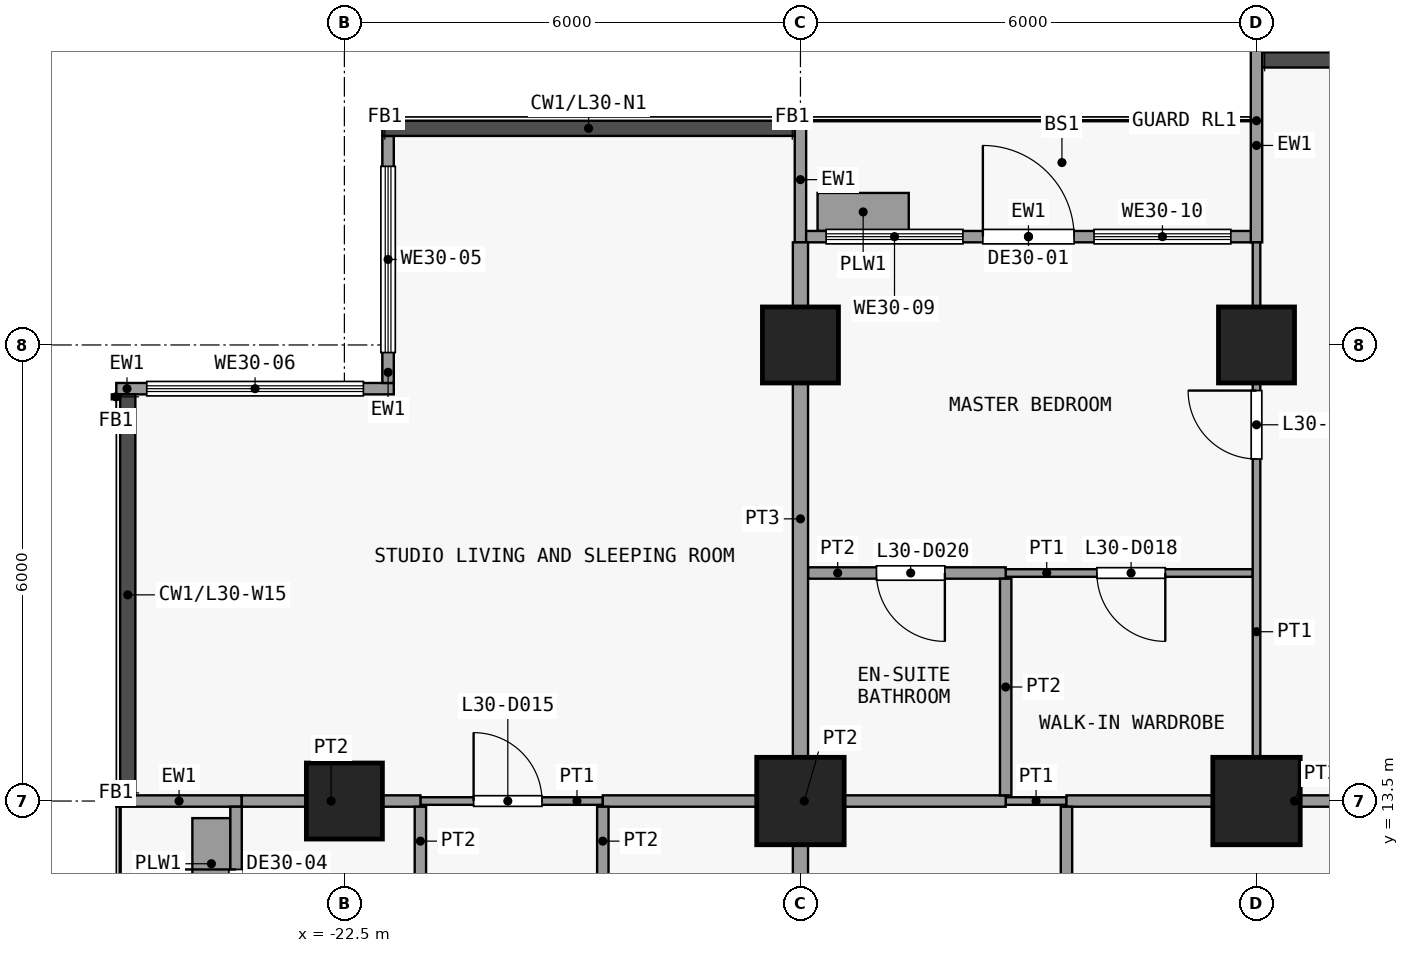
"""IFC4 building model, lengths in metres.
Left out: names, types, materials, properties, quantities, classifications, styles, units other than length and angle.
Written with IfcOpenShell. Run it as: python <this file> out.ifc"""

import sys

from ifc_helpers import new_model, si_unit, direction, frame, frame_2d, origin, origin_2d, place, context, subcontext, project, spatial, rectangle, extrude, element, fill, save


model = new_model("IFC4")
c1 = context("Model", 3, precision=1e-05, world=origin(), true_north=direction((0.0, 1.0)))
c2 = subcontext(c1, "Body", "Model", "MODEL_VIEW")
j1 = project(units=[si_unit("LENGTHUNIT", "METRE"), si_unit("PLANEANGLEUNIT", "RADIAN")], contexts=[c1])
p1 = place(None, origin())
s1 = spatial("IfcSite", under=j1, at=p1, CompositionType="ELEMENT")
p2 = place(p1, origin())
s2 = spatial("IfcBuilding", under=s1, at=p2, CompositionType="ELEMENT")
p3 = place(p2, frame((0.0, 0.0, 120.7)))
s3 = spatial("IfcBuildingStorey", under=s2, at=p3, CompositionType="ELEMENT", Elevation=120.7)
p4 = place(p3, frame((-22.5, 13.5, 0.0), z_axis=(0.0, 0.0, 1.0), x_axis=(1.0, 0.0, 0.0)))
e1 = element("IfcColumn", 1, at=p4, inside=s3, PredefinedType="COLUMN", context=c2, shape_type="SweptSolid", body=[
    extrude(rectangle(XDim=1.0, YDim=1.0, at=origin_2d()), origin(), (0.0, 0.0, 1.0), 3.6),
])
p5 = place(p3, frame((-16.5, 13.5, 0.0), z_axis=(0.0, 0.0, 1.0), x_axis=(1.0, 0.0, 0.0)))
e2 = element("IfcColumn", 2, at=p5, inside=s3, PredefinedType="COLUMN", context=c2, shape_type="SweptSolid", body=[
    extrude(rectangle(XDim=1.15, YDim=1.15, at=origin_2d()), origin(), (0.0, 0.0, 1.0), 3.6),
])
p6 = place(p3, frame((-16.5, 19.5, 0.0), z_axis=(0.0, 0.0, 1.0), x_axis=(1.0, 0.0, 0.0)))
e3 = element("IfcColumn", 3, at=p6, inside=s3, PredefinedType="COLUMN", context=c2, shape_type="SweptSolid", body=[
    extrude(rectangle(XDim=1.0, YDim=1.0, at=origin_2d()), origin(), (0.0, 0.0, 1.0), 3.6),
])
p7 = place(p3, frame((-10.5, 13.5, 0.0), z_axis=(0.0, 0.0, 1.0), x_axis=(1.0, 0.0, 0.0)))
e4 = element("IfcColumn", 4, at=p7, inside=s3, PredefinedType="COLUMN", context=c2, shape_type="SweptSolid", body=[
    extrude(rectangle(XDim=1.15, YDim=1.15, at=origin_2d()), origin(), (0.0, 0.0, 1.0), 3.6),
])
p8 = place(p3, frame((-10.5, 19.5, 0.0), z_axis=(0.0, 0.0, 1.0), x_axis=(1.0, 0.0, 0.0)))
e5 = element("IfcColumn", 5, at=p8, inside=s3, PredefinedType="COLUMN", context=c2, shape_type="SweptSolid", body=[
    extrude(rectangle(XDim=1.0, YDim=1.0, at=origin_2d()), origin(), (0.0, 0.0, 1.0), 3.6),
])
p9 = place(p3, frame((-21.925, 19.0, 0.0), z_axis=(0.0, 0.0, 1.0), x_axis=(0.0, 1.0, 0.0)))
e6 = element("IfcWall", 6, at=p9, inside=s3, PredefinedType="SOLIDWALL", context=c2, shape_type="SweptSolid", body=[
    extrude(rectangle(XDim=3.25, YDim=0.15, at=frame_2d((1.625, 0.0))), origin(), (0.0, 0.0, 1.0), 3.3),
])
p10 = place(p9, frame((0.4, 0.0, 0.9)))
e7 = element("IfcOpeningElement", 7, at=p10, cuts=e6, PredefinedType="OPENING", context=c2, shape_type="SweptSolid", body=[
    extrude(rectangle(XDim=2.45, YDim=2.4, at=frame_2d((1.225, 1.2))), frame((0.0, 0.085, 0.0), z_axis=(0.0, -1.0, 0.0), x_axis=(1.0, 0.0, 0.0)), (0.0, 0.0, 1.0), 0.17),
])
p11 = place(p3, frame((-25.5, 18.925, 0.0), z_axis=(0.0, 0.0, 1.0), x_axis=(1.0, 0.0, 0.0)))
e8 = element("IfcWall", 8, at=p11, inside=s3, PredefinedType="SOLIDWALL", context=c2, shape_type="SweptSolid", body=[
    extrude(rectangle(XDim=3.65, YDim=0.15, at=frame_2d((1.825, 0.0))), origin(), (0.0, 0.0, 1.0), 3.3),
])
p12 = place(p11, frame((0.4, 0.0, 0.9)))
e9 = element("IfcOpeningElement", 9, at=p12, cuts=e8, PredefinedType="OPENING", context=c2, shape_type="SweptSolid", body=[
    extrude(rectangle(XDim=2.85, YDim=2.4, at=frame_2d((1.425, 1.2))), frame((0.0, 0.085, 0.0), z_axis=(0.0, -1.0, 0.0), x_axis=(1.0, 0.0, 0.0)), (0.0, 0.0, 1.0), 0.17),
])
p13 = place(p3, frame((-16.5, 20.85, 0.0), z_axis=(0.0, 0.0, 1.0), x_axis=(0.0, 1.0, 0.0)))
e10 = element("IfcWall", 10, at=p13, inside=s3, PredefinedType="SOLIDWALL", context=c2, shape_type="SweptSolid", body=[
    extrude(rectangle(XDim=1.65, YDim=0.15, at=frame_2d((0.825, 0.0))), origin(), (0.0, 0.0, 1.0), 3.3),
])
p14 = place(p3, frame((-10.5, 20.85, 0.0), z_axis=(0.0, 0.0, 1.0), x_axis=(0.0, 1.0, 0.0)))
e11 = element("IfcWall", 11, at=p14, inside=s3, PredefinedType="SOLIDWALL", context=c2, shape_type="SweptSolid", body=[
    extrude(rectangle(XDim=2.55, YDim=0.15, at=frame_2d((1.275, 0.0))), origin(), (0.0, 0.0, 1.0), 3.3),
])
p15 = place(p3, frame((-16.425, 20.925, 0.0), z_axis=(0.0, 0.0, 1.0), x_axis=(1.0, 0.0, 0.0)))
e12 = element("IfcWall", 12, at=p15, inside=s3, PredefinedType="SOLIDWALL", context=c2, shape_type="SweptSolid", body=[
    extrude(rectangle(XDim=5.85, YDim=0.15, at=frame_2d((2.925, 0.0))), origin(), (0.0, 0.0, 1.0), 3.3),
])
p16 = place(p15, frame((2.325, 0.0, 0.0)))
e13 = element("IfcOpeningElement", 13, at=p16, cuts=e12, PredefinedType="OPENING", context=c2, shape_type="SweptSolid", body=[
    extrude(rectangle(XDim=1.2, YDim=2.4, at=frame_2d((0.6, 1.2))), frame((0.0, 0.085, 0.0), z_axis=(0.0, -1.0, 0.0), x_axis=(1.0, 0.0, 0.0)), (0.0, 0.0, 1.0), 0.17),
])
p17 = place(p15, frame((0.262, 0.0, 0.9)))
e14 = element("IfcOpeningElement", 14, at=p17, cuts=e12, PredefinedType="OPENING", context=c2, shape_type="SweptSolid", body=[
    extrude(rectangle(XDim=1.8, YDim=2.1, at=frame_2d((0.9, 1.05))), frame((0.0, 0.085, 0.0), z_axis=(0.0, -1.0, 0.0), x_axis=(1.0, 0.0, 0.0)), (0.0, 0.0, 1.0), 0.17),
])
p18 = place(p15, frame((3.788, 0.0, 0.9)))
e15 = element("IfcOpeningElement", 15, at=p18, cuts=e12, PredefinedType="OPENING", context=c2, shape_type="SweptSolid", body=[
    extrude(rectangle(XDim=1.8, YDim=2.1, at=frame_2d((0.9, 1.05))), frame((0.0, 0.085, 0.0), z_axis=(0.0, -1.0, 0.0), x_axis=(1.0, 0.0, 0.0)), (0.0, 0.0, 1.0), 0.17),
])
p19 = place(p3, frame((-16.275, 21.25, 0.0), z_axis=(0.0, 0.0, 1.0), x_axis=(1.0, 0.0, 0.0)))
e16 = element("IfcWall", 16, at=p19, inside=s3, PredefinedType="USERDEFINED", context=c2, shape_type="SweptSolid", body=[
    extrude(rectangle(XDim=1.2, YDim=0.5, at=frame_2d((0.6, 0.0))), origin(), (0.0, 0.0, 1.0), 0.9),
])
p20 = place(p3, frame((-23.85, 13.5, 0.0), z_axis=(0.0, 0.0, 1.0), x_axis=(-1.0, 0.0, 0.0)))
e17 = element("IfcWall", 17, at=p20, inside=s3, PredefinedType="SOLIDWALL", context=c2, shape_type="SweptSolid", body=[
    extrude(rectangle(XDim=1.65, YDim=0.15, at=frame_2d((0.825, 0.0))), origin(), (0.0, 0.0, 1.0), 3.3),
])
p21 = place(p3, frame((-23.925, 7.575, 0.0), z_axis=(0.0, 0.0, 1.0), x_axis=(0.0, 1.0, 0.0)))
e18 = element("IfcWall", 18, at=p21, inside=s3, PredefinedType="SOLIDWALL", context=c2, shape_type="SweptSolid", body=[
    extrude(rectangle(XDim=5.85, YDim=0.15, at=frame_2d((2.925, 0.0))), origin(), (0.0, 0.0, 1.0), 3.3),
])
p22 = place(p21, frame((3.825, 0.0, 0.0)))
e19 = element("IfcOpeningElement", 19, at=p22, cuts=e18, PredefinedType="OPENING", context=c2, shape_type="SweptSolid", body=[
    extrude(rectangle(XDim=1.2, YDim=2.4, at=frame_2d((0.6, 1.2))), frame((0.0, 0.085, 0.0), z_axis=(0.0, -1.0, 0.0), x_axis=(1.0, 0.0, 0.0)), (0.0, 0.0, 1.0), 0.17),
])
p23 = place(p21, frame((1.012, 0.0, 0.9)))
e20 = element("IfcOpeningElement", 20, at=p23, cuts=e18, PredefinedType="OPENING", context=c2, shape_type="SweptSolid", body=[
    extrude(rectangle(XDim=1.8, YDim=2.1, at=frame_2d((0.9, 1.05))), frame((0.0, 0.085, 0.0), z_axis=(0.0, -1.0, 0.0), x_axis=(1.0, 0.0, 0.0)), (0.0, 0.0, 1.0), 0.17),
])
p24 = place(p3, frame((-24.25, 12.075, 0.0), z_axis=(0.0, 0.0, 1.0), x_axis=(0.0, 1.0, 0.0)))
e21 = element("IfcWall", 21, at=p24, inside=s3, PredefinedType="USERDEFINED", context=c2, shape_type="SweptSolid", body=[
    extrude(rectangle(XDim=1.2, YDim=0.5, at=frame_2d((0.6, 0.0))), origin(), (0.0, 0.0, 1.0), 0.9),
])
p25 = place(p3, frame((-21.5, 13.5, 0.0), z_axis=(0.0, 0.0, 1.0), x_axis=(1.0, 0.0, 0.0)))
e22 = element("IfcWall", 22, at=p25, inside=s3, PredefinedType="PARTITIONING", context=c2, shape_type="SweptSolid", body=[
    extrude(rectangle(XDim=2.4, YDim=0.1, at=frame_2d((1.2, 0.0))), origin(), (0.0, 0.0, 1.0), 3.3),
])
p26 = place(p25, frame((0.7, 0.0, 0.0)))
e23 = element("IfcOpeningElement", 23, at=p26, cuts=e22, PredefinedType="OPENING", context=c2, shape_type="SweptSolid", body=[
    extrude(rectangle(XDim=0.9, YDim=2.1, at=frame_2d((0.45, 1.05))), frame((0.0, 0.06, 0.0), z_axis=(0.0, -1.0, 0.0), x_axis=(1.0, 0.0, 0.0)), (0.0, 0.0, 1.0), 0.12),
])
p27 = place(p3, frame((-13.8, 13.5, 0.0), z_axis=(0.0, 0.0, 1.0), x_axis=(1.0, 0.0, 0.0)))
e24 = element("IfcWall", 24, at=p27, inside=s3, PredefinedType="PARTITIONING", context=c2, shape_type="SweptSolid", body=[
    extrude(rectangle(XDim=0.8, YDim=0.1, at=frame_2d((0.4, 0.0))), origin(), (0.0, 0.0, 1.0), 3.3),
])
p28 = place(p3, frame((-23.85, 13.5, 0.0), z_axis=(0.0, 0.0, 1.0), x_axis=(1.0, 0.0, 0.0)))
e25 = element("IfcWall", 25, at=p28, inside=s3, PredefinedType="PARTITIONING", context=c2, shape_type="SweptSolid", body=[
    extrude(rectangle(XDim=2.35, YDim=0.15, at=frame_2d((1.175, 0.0))), origin(), (0.0, 0.0, 1.0), 3.3),
])
p29 = place(p3, frame((-19.1, 13.5, 0.0), z_axis=(0.0, 0.0, 1.0), x_axis=(1.0, 0.0, 0.0)))
e26 = element("IfcWall", 26, at=p29, inside=s3, PredefinedType="PARTITIONING", context=c2, shape_type="SweptSolid", body=[
    extrude(rectangle(XDim=5.3, YDim=0.15, at=frame_2d((2.65, 0.0))), origin(), (0.0, 0.0, 1.0), 3.3),
])
p30 = place(p3, frame((-13.0, 13.5, 0.0), z_axis=(0.0, 0.0, 1.0), x_axis=(1.0, 0.0, 0.0)))
e27 = element("IfcWall", 27, at=p30, inside=s3, PredefinedType="PARTITIONING", context=c2, shape_type="SweptSolid", body=[
    extrude(rectangle(XDim=6.0, YDim=0.15, at=frame_2d((3.0, 0.0))), origin(), (0.0, 0.0, 1.0), 3.3),
])
p31 = place(p3, frame((-13.8, 16.5, 0.0), z_axis=(0.0, 0.0, 1.0), x_axis=(1.0, 0.0, 0.0)))
e28 = element("IfcWall", 28, at=p31, inside=s3, PredefinedType="PARTITIONING", context=c2, shape_type="SweptSolid", body=[
    extrude(rectangle(XDim=3.25, YDim=0.1, at=frame_2d((1.625, 0.0))), origin(), (0.0, 0.0, 1.0), 3.3),
])
p32 = place(p31, frame((1.2, 0.0, 0.0)))
e29 = element("IfcOpeningElement", 29, at=p32, cuts=e28, PredefinedType="OPENING", context=c2, shape_type="SweptSolid", body=[
    extrude(rectangle(XDim=0.9, YDim=2.1, at=frame_2d((0.45, 1.05))), frame((0.0, 0.06, 0.0), z_axis=(0.0, -1.0, 0.0), x_axis=(1.0, 0.0, 0.0)), (0.0, 0.0, 1.0), 0.12),
])
p33 = place(p3, frame((-16.4, 16.5, 0.0), z_axis=(0.0, 0.0, 1.0), x_axis=(1.0, 0.0, 0.0)))
e30 = element("IfcWall", 30, at=p33, inside=s3, PredefinedType="PARTITIONING", context=c2, shape_type="SweptSolid", body=[
    extrude(rectangle(XDim=2.6, YDim=0.15, at=frame_2d((1.3, 0.0))), origin(), (0.0, 0.0, 1.0), 3.3),
])
p34 = place(p33, frame((0.9, 0.0, 0.0)))
e31 = element("IfcOpeningElement", 31, at=p34, cuts=e30, PredefinedType="OPENING", context=c2, shape_type="SweptSolid", body=[
    extrude(rectangle(XDim=0.9, YDim=2.1, at=frame_2d((0.45, 1.05))), frame((0.0, 0.085, 0.0), z_axis=(0.0, -1.0, 0.0), x_axis=(1.0, 0.0, 0.0)), (0.0, 0.0, 1.0), 0.17),
])
p35 = place(p3, frame((-21.5, 10.6, 0.0), z_axis=(0.0, 0.0, 1.0), x_axis=(0.0, 1.0, 0.0)))
e32 = element("IfcWall", 32, at=p35, inside=s3, PredefinedType="PARTITIONING", context=c2, shape_type="SweptSolid", body=[
    extrude(rectangle(XDim=2.825, YDim=0.15, at=frame_2d((1.413, 0.0))), origin(), (0.0, 0.0, 1.0), 3.3),
])
p36 = place(p35, frame((0.9, 0.0, 0.0)))
e33 = element("IfcOpeningElement", 33, at=p36, cuts=e32, PredefinedType="OPENING", context=c2, shape_type="SweptSolid", body=[
    extrude(rectangle(XDim=0.9, YDim=2.1, at=frame_2d((0.45, 1.05))), frame((0.0, 0.085, 0.0), z_axis=(0.0, -1.0, 0.0), x_axis=(1.0, 0.0, 0.0)), (0.0, 0.0, 1.0), 0.17),
])
p37 = place(p3, frame((-19.1, 10.6, 0.0), z_axis=(0.0, 0.0, 1.0), x_axis=(0.0, 1.0, 0.0)))
e34 = element("IfcWall", 34, at=p37, inside=s3, PredefinedType="PARTITIONING", context=c2, shape_type="SweptSolid", body=[
    extrude(rectangle(XDim=2.825, YDim=0.15, at=frame_2d((1.413, 0.0))), origin(), (0.0, 0.0, 1.0), 3.3),
])
p38 = place(p37, frame((0.9, 0.0, 0.0)))
e35 = element("IfcOpeningElement", 35, at=p38, cuts=e34, PredefinedType="OPENING", context=c2, shape_type="SweptSolid", body=[
    extrude(rectangle(XDim=0.9, YDim=2.1, at=frame_2d((0.45, 1.05))), frame((0.0, 0.085, 0.0), z_axis=(0.0, -1.0, 0.0), x_axis=(1.0, 0.0, 0.0)), (0.0, 0.0, 1.0), 0.17),
])
p39 = place(p3, frame((-16.5, 10.6, 0.0), z_axis=(0.0, 0.0, 1.0), x_axis=(0.0, 1.0, 0.0)))
e36 = element("IfcWall", 36, at=p39, inside=s3, PredefinedType="PARTITIONING", context=c2, shape_type="SweptSolid", body=[
    extrude(rectangle(XDim=2.825, YDim=0.2, at=frame_2d((1.413, 0.0))), origin(), (0.0, 0.0, 1.0), 3.3),
])
p40 = place(p3, frame((-16.5, 13.575, 0.0), z_axis=(0.0, 0.0, 1.0), x_axis=(0.0, 1.0, 0.0)))
e37 = element("IfcWall", 37, at=p40, inside=s3, PredefinedType="PARTITIONING", context=c2, shape_type="SweptSolid", body=[
    extrude(rectangle(XDim=7.275, YDim=0.2, at=frame_2d((3.638, 0.0))), origin(), (0.0, 0.0, 1.0), 3.3),
])
p41 = place(p3, frame((-13.8, 13.575, 0.0), z_axis=(0.0, 0.0, 1.0), x_axis=(0.0, 1.0, 0.0)))
e38 = element("IfcWall", 38, at=p41, inside=s3, PredefinedType="PARTITIONING", context=c2, shape_type="SweptSolid", body=[
    extrude(rectangle(XDim=2.85, YDim=0.15, at=frame_2d((1.425, 0.0))), origin(), (0.0, 0.0, 1.0), 3.3),
])
p42 = place(p3, frame((-13.0, 10.6, 0.0), z_axis=(0.0, 0.0, 1.0), x_axis=(0.0, 1.0, 0.0)))
e39 = element("IfcWall", 39, at=p42, inside=s3, PredefinedType="PARTITIONING", context=c2, shape_type="SweptSolid", body=[
    extrude(rectangle(XDim=2.825, YDim=0.15, at=frame_2d((1.413, 0.0))), origin(), (0.0, 0.0, 1.0), 3.3),
])
p43 = place(p42, frame((1.0, 0.0, 0.0)))
e40 = element("IfcOpeningElement", 40, at=p43, cuts=e39, PredefinedType="OPENING", context=c2, shape_type="SweptSolid", body=[
    extrude(rectangle(XDim=0.9, YDim=2.1, at=frame_2d((0.45, 1.05))), frame((0.0, 0.085, 0.0), z_axis=(0.0, -1.0, 0.0), x_axis=(1.0, 0.0, 0.0)), (0.0, 0.0, 1.0), 0.17),
])
p44 = place(p3, frame((-10.5, 13.575, 0.0), z_axis=(0.0, 0.0, 1.0), x_axis=(0.0, 1.0, 0.0)))
e41 = element("IfcWall", 41, at=p44, inside=s3, PredefinedType="PARTITIONING", context=c2, shape_type="SweptSolid", body=[
    extrude(rectangle(XDim=7.275, YDim=0.1, at=frame_2d((3.638, 0.0))), origin(), (0.0, 0.0, 1.0), 3.3),
])
p45 = place(p44, frame((4.425, 0.0, 0.0)))
e42 = element("IfcOpeningElement", 42, at=p45, cuts=e41, PredefinedType="OPENING", context=c2, shape_type="SweptSolid", body=[
    extrude(rectangle(XDim=0.9, YDim=2.1, at=frame_2d((0.45, 1.05))), frame((0.0, 0.06, 0.0), z_axis=(0.0, -1.0, 0.0), x_axis=(1.0, 0.0, 0.0)), (0.0, 0.0, 1.0), 0.12),
])
p46 = place(p10, origin())
e43 = element("IfcWindow", 43, at=p46, inside=s3, PartitioningType="SINGLE_PANEL", PredefinedType="WINDOW", context=c2, shape_type="SweptSolid", body=[
    extrude(rectangle(XDim=2.45, YDim=2.4, at=frame_2d((1.225, 1.2))), frame((0.0, 0.03, 0.0), z_axis=(0.0, -1.0, 0.0), x_axis=(1.0, 0.0, 0.0)), (0.0, 0.0, 1.0), 0.06),
])
fill(e7, e43)
p47 = place(p12, origin())
e44 = element("IfcWindow", 44, at=p47, inside=s3, PartitioningType="SINGLE_PANEL", PredefinedType="WINDOW", context=c2, shape_type="SweptSolid", body=[
    extrude(rectangle(XDim=2.85, YDim=2.4, at=frame_2d((1.425, 1.2))), frame((0.0, 0.03, 0.0), z_axis=(0.0, -1.0, 0.0), x_axis=(1.0, 0.0, 0.0)), (0.0, 0.0, 1.0), 0.06),
])
fill(e9, e44)
p48 = place(p16, origin())
e45 = element("IfcDoor", 45, at=p48, inside=s3, OperationType="SINGLE_SWING_LEFT", PredefinedType="DOOR", context=c2, shape_type="SweptSolid", body=[
    extrude(rectangle(XDim=1.2, YDim=2.4, at=frame_2d((0.6, 1.2))), frame((0.0, 0.025, 0.0), z_axis=(0.0, -1.0, 0.0), x_axis=(1.0, 0.0, 0.0)), (0.0, 0.0, 1.0), 0.05),
])
fill(e13, e45)
p49 = place(p17, origin())
e46 = element("IfcWindow", 46, at=p49, inside=s3, PartitioningType="SINGLE_PANEL", PredefinedType="WINDOW", context=c2, shape_type="SweptSolid", body=[
    extrude(rectangle(XDim=1.8, YDim=2.1, at=frame_2d((0.9, 1.05))), frame((0.0, 0.03, 0.0), z_axis=(0.0, -1.0, 0.0), x_axis=(1.0, 0.0, 0.0)), (0.0, 0.0, 1.0), 0.06),
])
fill(e14, e46)
p50 = place(p18, origin())
e47 = element("IfcWindow", 47, at=p50, inside=s3, PartitioningType="SINGLE_PANEL", PredefinedType="WINDOW", context=c2, shape_type="SweptSolid", body=[
    extrude(rectangle(XDim=1.8, YDim=2.1, at=frame_2d((0.9, 1.05))), frame((0.0, 0.03, 0.0), z_axis=(0.0, -1.0, 0.0), x_axis=(1.0, 0.0, 0.0)), (0.0, 0.0, 1.0), 0.06),
])
fill(e15, e47)
p51 = place(p22, origin())
e48 = element("IfcDoor", 48, at=p51, inside=s3, OperationType="SINGLE_SWING_RIGHT", PredefinedType="DOOR", context=c2, shape_type="SweptSolid", body=[
    extrude(rectangle(XDim=1.2, YDim=2.4, at=frame_2d((0.6, 1.2))), frame((0.0, 0.025, 0.0), z_axis=(0.0, -1.0, 0.0), x_axis=(1.0, 0.0, 0.0)), (0.0, 0.0, 1.0), 0.05),
])
fill(e19, e48)
p52 = place(p26, origin())
e49 = element("IfcDoor", 49, at=p52, inside=s3, OperationType="SINGLE_SWING_RIGHT", PredefinedType="DOOR", context=c2, shape_type="SweptSolid", body=[
    extrude(rectangle(XDim=0.9, YDim=2.1, at=frame_2d((0.45, 1.05))), frame((0.0, 0.025, 0.0), z_axis=(0.0, -1.0, 0.0), x_axis=(1.0, 0.0, 0.0)), (0.0, 0.0, 1.0), 0.05),
])
fill(e23, e49)
p53 = place(p32, origin())
e50 = element("IfcDoor", 50, at=p53, inside=s3, OperationType="SINGLE_SWING_RIGHT", PredefinedType="DOOR", context=c2, shape_type="SweptSolid", body=[
    extrude(rectangle(XDim=0.9, YDim=2.1, at=frame_2d((0.45, 1.05))), frame((0.0, 0.025, 0.0), z_axis=(0.0, -1.0, 0.0), x_axis=(1.0, 0.0, 0.0)), (0.0, 0.0, 1.0), 0.05),
])
fill(e29, e50)
p54 = place(p34, origin())
e51 = element("IfcDoor", 51, at=p54, inside=s3, OperationType="SINGLE_SWING_RIGHT", PredefinedType="DOOR", context=c2, shape_type="SweptSolid", body=[
    extrude(rectangle(XDim=0.9, YDim=2.1, at=frame_2d((0.45, 1.05))), frame((0.0, 0.025, 0.0), z_axis=(0.0, -1.0, 0.0), x_axis=(1.0, 0.0, 0.0)), (0.0, 0.0, 1.0), 0.05),
])
fill(e31, e51)
p55 = place(p45, origin())
e52 = element("IfcDoor", 52, at=p55, inside=s3, OperationType="SINGLE_SWING_LEFT", PredefinedType="DOOR", context=c2, shape_type="SweptSolid", body=[
    extrude(rectangle(XDim=0.9, YDim=2.1, at=frame_2d((0.45, 1.05))), frame((0.0, 0.025, 0.0), z_axis=(0.0, -1.0, 0.0), x_axis=(1.0, 0.0, 0.0)), (0.0, 0.0, 1.0), 0.05),
])
fill(e42, e52)
save(model, sys.argv[1])
